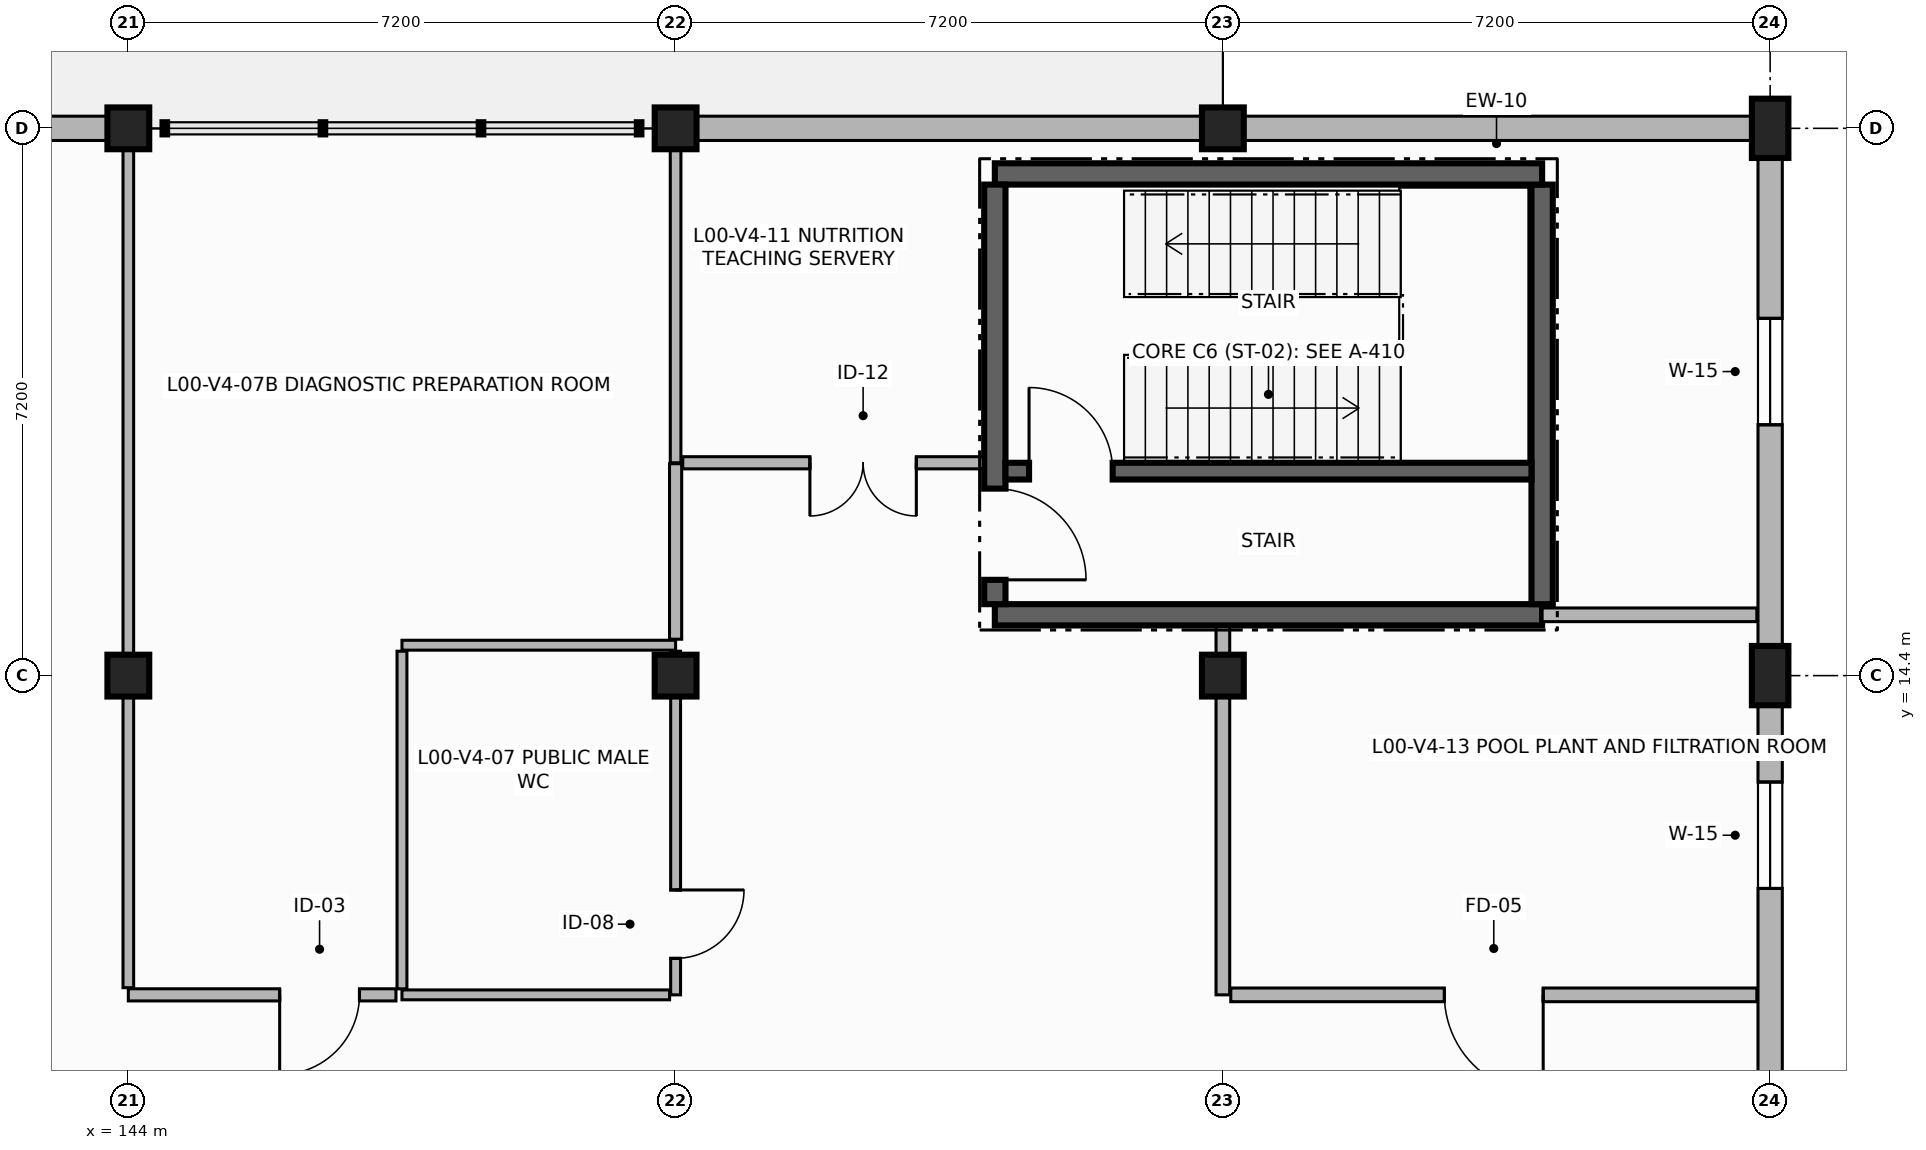
"""IFC4 building model, lengths in metres.
Left out: names, types, materials, properties, quantities, classifications, styles, units other than length and angle.
Written with IfcOpenShell. Run it as: python <this file> out.ifc"""

import sys

from ifc_helpers import new_model, si_unit, direction, frame, frame_2d, origin, origin_2d, place, context, subcontext, project, spatial, rectangle, extrude, element, fill, save


model = new_model("IFC4")
c1 = context("Model", 3, precision=1e-05, world=origin(), true_north=direction((0.0, 1.0)))
c2 = subcontext(c1, "Body", "Model", "MODEL_VIEW")
j1 = project(units=[si_unit("LENGTHUNIT", "METRE"), si_unit("PLANEANGLEUNIT", "RADIAN")], contexts=[c1])
p1 = place(None, origin())
s1 = spatial("IfcSite", under=j1, at=p1, CompositionType="ELEMENT")
p2 = place(p1, origin())
s2 = spatial("IfcBuilding", under=s1, at=p2, CompositionType="ELEMENT")
p3 = place(p2, origin())
s3 = spatial("IfcBuildingStorey", under=s2, at=p3, CompositionType="ELEMENT", Elevation=0.0)
for number, where, z_axis, x_axis in (
    (1, (144.0, 14.4, -0.35), (0.0, 0.0, 1.0), (1.0, 0.0, 0.0)),
    (2, (144.0, 21.6, -0.35), (0.0, 0.0, 1.0), (1.0, 0.0, 0.0)),
    (3, (151.2, 14.4, -0.35), (0.0, 0.0, 1.0), (1.0, 0.0, 0.0)),
    (4, (151.2, 21.6, -0.35), (0.0, 0.0, 1.0), (1.0, 0.0, 0.0)),
    (5, (158.4, 14.4, -0.35), (0.0, 0.0, 1.0), (1.0, 0.0, 0.0)),
    (6, (158.4, 21.6, -0.35), (0.0, 0.0, 1.0), (1.0, 0.0, 0.0)),
):
    element("IfcColumn", number, at=place(p3, frame(where, z_axis=z_axis, x_axis=x_axis)), inside=s3, PredefinedType="COLUMN", context=c2, shape_type="SweptSolid", body=[
        extrude(rectangle(XDim=0.55, YDim=0.55, at=origin_2d()), origin(), (0.0, 0.0, 1.0), 4.59),
    ])
for number, where, z_axis, x_axis in (
    (7, (165.6, 14.4, -0.35), (0.0, 0.0, 1.0), (1.0, 0.0, 0.0)),
    (8, (165.6, 21.6, -0.35), (0.0, 0.0, 1.0), (1.0, 0.0, 0.0)),
):
    element("IfcColumn", number, at=place(p3, frame(where, z_axis=z_axis, x_axis=x_axis)), inside=s3, PredefinedType="PILASTER", context=c2, shape_type="SweptSolid", body=[
        extrude(rectangle(XDim=0.48, YDim=0.78, at=origin_2d()), origin(), (0.0, 0.0, 1.0), 4.59),
    ])
p4 = place(p3, frame((165.6, 7.2, 0.0), z_axis=(0.0, 0.0, 1.0), x_axis=(0.0, 1.0, 0.0)))
e9 = element("IfcWall", 9, at=p4, inside=s3, PredefinedType="SOLIDWALL", context=c2, shape_type="SweptSolid", body=[
    extrude(rectangle(XDim=7.2, YDim=0.32, at=frame_2d((3.6, 0.0))), origin(), (0.0, 0.0, 1.0), 3.62),
])
p5 = place(p4, frame((4.4, 0.0, 0.85)))
e10 = element("IfcOpeningElement", 10, at=p5, cuts=e9, PredefinedType="OPENING", context=c2, shape_type="SweptSolid", body=[
    extrude(rectangle(XDim=1.4, YDim=2.2, at=frame_2d((0.7, 1.1))), frame((0.0, 0.17, 0.0), z_axis=(0.0, -1.0, 0.0), x_axis=(1.0, 0.0, 0.0)), (0.0, 0.0, 1.0), 0.34),
])
p6 = place(p3, frame((165.6, 14.4, 0.0), z_axis=(0.0, 0.0, 1.0), x_axis=(0.0, 1.0, 0.0)))
e11 = element("IfcWall", 11, at=p6, inside=s3, PredefinedType="SOLIDWALL", context=c2, shape_type="SweptSolid", body=[
    extrude(rectangle(XDim=7.2, YDim=0.32, at=frame_2d((3.6, 0.0))), origin(), (0.0, 0.0, 1.0), 3.62),
])
p7 = place(p6, frame((3.3, 0.0, 0.85)))
e12 = element("IfcOpeningElement", 12, at=p7, cuts=e11, PredefinedType="OPENING", context=c2, shape_type="SweptSolid", body=[
    extrude(rectangle(XDim=1.4, YDim=2.2, at=frame_2d((0.7, 1.1))), frame((0.0, 0.17, 0.0), z_axis=(0.0, -1.0, 0.0), x_axis=(1.0, 0.0, 0.0)), (0.0, 0.0, 1.0), 0.34),
])
p8 = place(p3, frame((165.6, 21.6, 0.0), z_axis=(0.0, 0.0, 1.0), x_axis=(-1.0, 0.0, 0.0)))
e13 = element("IfcWall", 13, at=p8, inside=s3, PredefinedType="SOLIDWALL", context=c2, shape_type="SweptSolid", body=[
    extrude(rectangle(XDim=7.2, YDim=0.32, at=frame_2d((3.6, 0.0))), origin(), (0.0, 0.0, 1.0), 3.62),
])
p9 = place(p3, frame((158.4, 21.6, 0.0), z_axis=(0.0, 0.0, 1.0), x_axis=(-1.0, 0.0, 0.0)))
e14 = element("IfcWall", 14, at=p9, inside=s3, PredefinedType="SOLIDWALL", context=c2, shape_type="SweptSolid", body=[
    extrude(rectangle(XDim=7.2, YDim=0.32, at=frame_2d((3.6, 0.0))), origin(), (0.0, 0.0, 1.0), 3.62),
])
p10 = place(p3, frame((144.0, 21.6, 0.0), z_axis=(0.0, 0.0, 1.0), x_axis=(-1.0, 0.0, 0.0)))
e15 = element("IfcWall", 15, at=p10, inside=s3, PredefinedType="SOLIDWALL", context=c2, shape_type="SweptSolid", body=[
    extrude(rectangle(XDim=7.2, YDim=0.32, at=frame_2d((3.6, 0.0))), origin(), (0.0, 0.0, 1.0), 3.62),
])
p11 = place(p10, frame((2.75, 0.0, 0.0)))
e16 = element("IfcOpeningElement", 16, at=p11, cuts=e15, PredefinedType="OPENING", context=c2, shape_type="SweptSolid", body=[
    extrude(rectangle(XDim=1.7, YDim=2.45, at=frame_2d((0.85, 1.225))), frame((0.0, 0.17, 0.0), z_axis=(0.0, -1.0, 0.0), x_axis=(1.0, 0.0, 0.0)), (0.0, 0.0, 1.0), 0.34),
])
p12 = place(p3, frame((155.4, 15.2, 0.0), z_axis=(0.0, 0.0, 1.0), x_axis=(1.0, 0.0, 0.0)))
e17 = element("IfcWall", 17, at=p12, inside=s3, PredefinedType="SHEAR", context=c2, shape_type="SweptSolid", body=[
    extrude(rectangle(XDim=7.2, YDim=0.28, at=frame_2d((3.6, 0.0))), origin(), (0.0, 0.0, 1.0), 4.24),
])
p13 = place(p3, frame((162.6, 15.34, 0.0), z_axis=(0.0, 0.0, 1.0), x_axis=(0.0, 1.0, 0.0)))
e18 = element("IfcWall", 18, at=p13, inside=s3, PredefinedType="SHEAR", context=c2, shape_type="SweptSolid", body=[
    extrude(rectangle(XDim=5.52, YDim=0.28, at=frame_2d((2.76, 0.0))), origin(), (0.0, 0.0, 1.0), 4.24),
])
p14 = place(p3, frame((162.6, 21.0, 0.0), z_axis=(0.0, 0.0, 1.0), x_axis=(-1.0, 0.0, 0.0)))
e19 = element("IfcWall", 19, at=p14, inside=s3, PredefinedType="SHEAR", context=c2, shape_type="SweptSolid", body=[
    extrude(rectangle(XDim=7.2, YDim=0.28, at=frame_2d((3.6, 0.0))), origin(), (0.0, 0.0, 1.0), 4.24),
])
p15 = place(p3, frame((155.4, 20.86, 0.0), z_axis=(0.0, 0.0, 1.0), x_axis=(0.0, -1.0, 0.0)))
e20 = element("IfcWall", 20, at=p15, inside=s3, PredefinedType="SHEAR", context=c2, shape_type="SweptSolid", body=[
    extrude(rectangle(XDim=5.52, YDim=0.28, at=frame_2d((2.76, 0.0))), origin(), (0.0, 0.0, 1.0), 4.24),
])
p16 = place(p15, frame((4.0, 0.0, 0.0)))
e21 = element("IfcOpeningElement", 21, at=p16, cuts=e20, PredefinedType="OPENING", context=c2, shape_type="SweptSolid", body=[
    extrude(rectangle(XDim=1.2, YDim=2.25, at=frame_2d((0.6, 1.125))), frame((0.0, 0.15, 0.0), z_axis=(0.0, -1.0, 0.0), x_axis=(1.0, 0.0, 0.0)), (0.0, 0.0, 1.0), 0.3),
])
p17 = place(p3, frame((155.54, 17.09, 0.0), z_axis=(0.0, 0.0, 1.0), x_axis=(1.0, 0.0, 0.0)))
e22 = element("IfcWall", 22, at=p17, inside=s3, PredefinedType="SHEAR", context=c2, shape_type="SweptSolid", body=[
    extrude(rectangle(XDim=6.92, YDim=0.22, at=frame_2d((3.46, 0.0))), origin(), (0.0, 0.0, 1.0), 4.24),
])
p18 = place(p17, frame((0.31, 0.0, 0.0)))
e23 = element("IfcOpeningElement", 23, at=p18, cuts=e22, PredefinedType="OPENING", context=c2, shape_type="SweptSolid", body=[
    extrude(rectangle(XDim=1.1, YDim=2.15, at=frame_2d((0.55, 1.075))), frame((0.0, 0.12, 0.0), z_axis=(0.0, -1.0, 0.0), x_axis=(1.0, 0.0, 0.0)), (0.0, 0.0, 1.0), 0.24),
])
p19 = place(p3, frame((147.6, 14.8, 0.0), z_axis=(0.0, 0.0, 1.0), x_axis=(1.0, 0.0, 0.0)))
e24 = element("IfcWall", 24, at=p19, inside=s3, PredefinedType="PARTITIONING", context=c2, shape_type="SweptSolid", body=[
    extrude(rectangle(XDim=3.6, YDim=0.13, at=frame_2d((1.8, 0.0))), origin(), (0.0, 0.0, 1.0), 3.6),
])
p20 = place(p3, frame((151.2, 14.721, 0.0), z_axis=(0.0, 0.0, 1.0), x_axis=(0.0, -1.0, 0.0)))
e25 = element("IfcWall", 25, at=p20, inside=s3, PredefinedType="PARTITIONING", context=c2, shape_type="SweptSolid", body=[
    extrude(rectangle(XDim=4.521, YDim=0.13, at=frame_2d((2.26, 0.0))), origin(), (0.0, 0.0, 1.0), 3.6),
])
p21 = place(p20, frame((3.141, 0.0, 0.0)))
e26 = element("IfcOpeningElement", 26, at=p21, cuts=e25, PredefinedType="OPENING", context=c2, shape_type="SweptSolid", body=[
    extrude(rectangle(XDim=0.9, YDim=2.1, at=frame_2d((0.45, 1.05))), frame((0.0, 0.075, 0.0), z_axis=(0.0, -1.0, 0.0), x_axis=(1.0, 0.0, 0.0)), (0.0, 0.0, 1.0), 0.15),
])
p22 = place(p3, frame((151.121, 10.2, 0.0), z_axis=(0.0, 0.0, 1.0), x_axis=(-1.0, 0.0, 0.0)))
e27 = element("IfcWall", 27, at=p22, inside=s3, PredefinedType="PARTITIONING", context=c2, shape_type="SweptSolid", body=[
    extrude(rectangle(XDim=3.521, YDim=0.13, at=frame_2d((1.76, 0.0))), origin(), (0.0, 0.0, 1.0), 3.6),
])
p23 = place(p3, frame((147.6, 10.279, 0.0), z_axis=(0.0, 0.0, 1.0), x_axis=(0.0, 1.0, 0.0)))
e28 = element("IfcWall", 28, at=p23, inside=s3, PredefinedType="PARTITIONING", context=c2, shape_type="SweptSolid", body=[
    extrude(rectangle(XDim=4.442, YDim=0.13, at=frame_2d((2.221, 0.0))), origin(), (0.0, 0.0, 1.0), 3.6),
])
p24 = place(p3, frame((151.2, 21.425, 0.0), z_axis=(0.0, 0.0, 1.0), x_axis=(0.0, -1.0, 0.0)))
e29 = element("IfcWall", 29, at=p24, inside=s3, PredefinedType="PARTITIONING", context=c2, shape_type="SweptSolid", body=[
    extrude(rectangle(XDim=4.225, YDim=0.14, at=frame_2d((2.113, 0.0))), origin(), (0.0, 0.0, 1.0), 3.6),
])
p25 = place(p3, frame((151.2, 17.188, 0.0), z_axis=(0.0, 0.0, 1.0), x_axis=(0.0, -1.0, 0.0)))
e30 = element("IfcWall", 30, at=p25, inside=s3, PredefinedType="PARTITIONING", context=c2, shape_type="SweptSolid", body=[
    extrude(rectangle(XDim=2.309, YDim=0.16, at=frame_2d((1.155, 0.0))), origin(), (0.0, 0.0, 1.0), 3.6),
])
p26 = place(p3, frame((147.521, 10.2, 0.0), z_axis=(0.0, 0.0, 1.0), x_axis=(-1.0, 0.0, 0.0)))
e31 = element("IfcWall", 31, at=p26, inside=s3, PredefinedType="PARTITIONING", context=c2, shape_type="SweptSolid", body=[
    extrude(rectangle(XDim=3.521, YDim=0.16, at=frame_2d((1.76, 0.0))), origin(), (0.0, 0.0, 1.0), 3.6),
])
p27 = place(p26, frame((0.48, 0.0, 0.0)))
e32 = element("IfcOpeningElement", 32, at=p27, cuts=e31, PredefinedType="OPENING", context=c2, shape_type="SweptSolid", body=[
    extrude(rectangle(XDim=1.05, YDim=2.15, at=frame_2d((0.525, 1.075))), frame((0.0, 0.09, 0.0), z_axis=(0.0, -1.0, 0.0), x_axis=(1.0, 0.0, 0.0)), (0.0, 0.0, 1.0), 0.18),
])
p28 = place(p3, frame((144.0, 10.294, 0.0), z_axis=(0.0, 0.0, 1.0), x_axis=(0.0, 1.0, 0.0)))
e33 = element("IfcWall", 33, at=p28, inside=s3, PredefinedType="PARTITIONING", context=c2, shape_type="SweptSolid", body=[
    extrude(rectangle(XDim=11.131, YDim=0.14, at=frame_2d((5.565, 0.0))), origin(), (0.0, 0.0, 1.0), 3.6),
])
p29 = place(p3, frame((155.245, 17.2, 0.0), z_axis=(0.0, 0.0, 1.0), x_axis=(-1.0, 0.0, 0.0)))
e34 = element("IfcWall", 34, at=p29, inside=s3, PredefinedType="PARTITIONING", context=c2, shape_type="SweptSolid", body=[
    extrude(rectangle(XDim=3.951, YDim=0.16, at=frame_2d((1.976, 0.0))), origin(), (0.0, 0.0, 1.0), 3.6),
])
p30 = place(p29, frame((0.878, 0.0, 0.0)))
e35 = element("IfcOpeningElement", 35, at=p30, cuts=e34, PredefinedType="OPENING", context=c2, shape_type="SweptSolid", body=[
    extrude(rectangle(XDim=1.4, YDim=2.3, at=frame_2d((0.7, 1.15))), frame((0.0, 0.09, 0.0), z_axis=(0.0, -1.0, 0.0), x_axis=(1.0, 0.0, 0.0)), (0.0, 0.0, 1.0), 0.18),
])
p31 = place(p3, frame((158.4, 10.2, 0.0), z_axis=(0.0, 0.0, 1.0), x_axis=(0.0, 1.0, 0.0)))
e36 = element("IfcWall", 36, at=p31, inside=s3, PredefinedType="PARTITIONING", context=c2, shape_type="SweptSolid", body=[
    extrude(rectangle(XDim=4.845, YDim=0.18, at=frame_2d((2.422, 0.0))), origin(), (0.0, 0.0, 1.0), 3.6),
])
p32 = place(p3, frame((162.6, 15.2, 0.0), z_axis=(0.0, 0.0, 1.0), x_axis=(1.0, 0.0, 0.0)))
e37 = element("IfcWall", 37, at=p32, inside=s3, PredefinedType="PARTITIONING", context=c2, shape_type="SweptSolid", body=[
    extrude(rectangle(XDim=2.825, YDim=0.18, at=frame_2d((1.413, 0.0))), origin(), (0.0, 0.0, 1.0), 3.6),
])
p33 = place(p3, frame((165.425, 10.2, 0.0), z_axis=(0.0, 0.0, 1.0), x_axis=(-1.0, 0.0, 0.0)))
e38 = element("IfcWall", 38, at=p33, inside=s3, PredefinedType="PARTITIONING", context=c2, shape_type="SweptSolid", body=[
    extrude(rectangle(XDim=6.921, YDim=0.18, at=frame_2d((3.46, 0.0))), origin(), (0.0, 0.0, 1.0), 3.6),
])
p34 = place(p33, frame((2.811, 0.0, 0.0)))
e39 = element("IfcOpeningElement", 39, at=p34, cuts=e38, PredefinedType="OPENING", context=c2, shape_type="SweptSolid", body=[
    extrude(rectangle(XDim=1.3, YDim=2.2, at=frame_2d((0.65, 1.1))), frame((0.0, 0.1, 0.0), z_axis=(0.0, -1.0, 0.0), x_axis=(1.0, 0.0, 0.0)), (0.0, 0.0, 1.0), 0.2),
])
p35 = place(p5, origin())
e40 = element("IfcWindow", 40, at=p35, inside=s3, PartitioningType="SINGLE_PANEL", PredefinedType="WINDOW", context=c2, shape_type="SweptSolid", body=[
    extrude(rectangle(XDim=1.4, YDim=2.2, at=frame_2d((0.7, 1.1))), frame((0.0, 0.03, 0.0), z_axis=(0.0, -1.0, 0.0), x_axis=(1.0, 0.0, 0.0)), (0.0, 0.0, 1.0), 0.06),
])
fill(e10, e40)
p36 = place(p7, origin())
e41 = element("IfcWindow", 41, at=p36, inside=s3, PartitioningType="SINGLE_PANEL", PredefinedType="WINDOW", context=c2, shape_type="SweptSolid", body=[
    extrude(rectangle(XDim=1.4, YDim=2.2, at=frame_2d((0.7, 1.1))), frame((0.0, 0.03, 0.0), z_axis=(0.0, -1.0, 0.0), x_axis=(1.0, 0.0, 0.0)), (0.0, 0.0, 1.0), 0.06),
])
fill(e12, e41)
p37 = place(p18, origin())
e42 = element("IfcDoor", 42, at=p37, inside=s3, OperationType="SINGLE_SWING_LEFT", PredefinedType="DOOR", context=c2, shape_type="SweptSolid", body=[
    extrude(rectangle(XDim=1.1, YDim=2.15, at=frame_2d((0.55, 1.075))), frame((0.0, 0.025, 0.0), z_axis=(0.0, -1.0, 0.0), x_axis=(1.0, 0.0, 0.0)), (0.0, 0.0, 1.0), 0.05),
])
fill(e23, e42)
p38 = place(p16, origin())
e43 = element("IfcDoor", 43, at=p38, inside=s3, OperationType="SINGLE_SWING_RIGHT", PredefinedType="DOOR", context=c2, shape_type="SweptSolid", body=[
    extrude(rectangle(XDim=1.2, YDim=2.25, at=frame_2d((0.6, 1.125))), frame((0.0, 0.025, 0.0), z_axis=(0.0, -1.0, 0.0), x_axis=(1.0, 0.0, 0.0)), (0.0, 0.0, 1.0), 0.05),
])
fill(e21, e43)
p39 = place(p21, origin())
e44 = element("IfcDoor", 44, at=p39, inside=s3, OperationType="SINGLE_SWING_LEFT", PredefinedType="DOOR", context=c2, shape_type="SweptSolid", body=[
    extrude(rectangle(XDim=0.9, YDim=2.1, at=frame_2d((0.45, 1.05))), frame((0.0, 0.025, 0.0), z_axis=(0.0, -1.0, 0.0), x_axis=(1.0, 0.0, 0.0)), (0.0, 0.0, 1.0), 0.05),
])
fill(e26, e44)
p40 = place(p27, origin())
e45 = element("IfcDoor", 45, at=p40, inside=s3, OperationType="SINGLE_SWING_RIGHT", PredefinedType="DOOR", context=c2, shape_type="SweptSolid", body=[
    extrude(rectangle(XDim=1.05, YDim=2.15, at=frame_2d((0.525, 1.075))), frame((0.0, 0.025, 0.0), z_axis=(0.0, -1.0, 0.0), x_axis=(1.0, 0.0, 0.0)), (0.0, 0.0, 1.0), 0.05),
])
fill(e32, e45)
p41 = place(p30, origin())
e46 = element("IfcDoor", 46, at=p41, inside=s3, OperationType="DOUBLE_DOOR_SINGLE_SWING", PredefinedType="DOOR", context=c2, shape_type="SweptSolid", body=[
    extrude(rectangle(XDim=1.4, YDim=2.3, at=frame_2d((0.7, 1.15))), frame((0.0, 0.025, 0.0), z_axis=(0.0, -1.0, 0.0), x_axis=(1.0, 0.0, 0.0)), (0.0, 0.0, 1.0), 0.05),
])
fill(e35, e46)
p42 = place(p34, origin())
e47 = element("IfcDoor", 47, at=p42, inside=s3, OperationType="SINGLE_SWING_LEFT", PredefinedType="DOOR", context=c2, shape_type="SweptSolid", body=[
    extrude(rectangle(XDim=1.3, YDim=2.2, at=frame_2d((0.65, 1.1))), frame((0.0, 0.025, 0.0), z_axis=(0.0, -1.0, 0.0), x_axis=(1.0, 0.0, 0.0)), (0.0, 0.0, 1.0), 0.05),
])
fill(e39, e47)
save(model, sys.argv[1])
